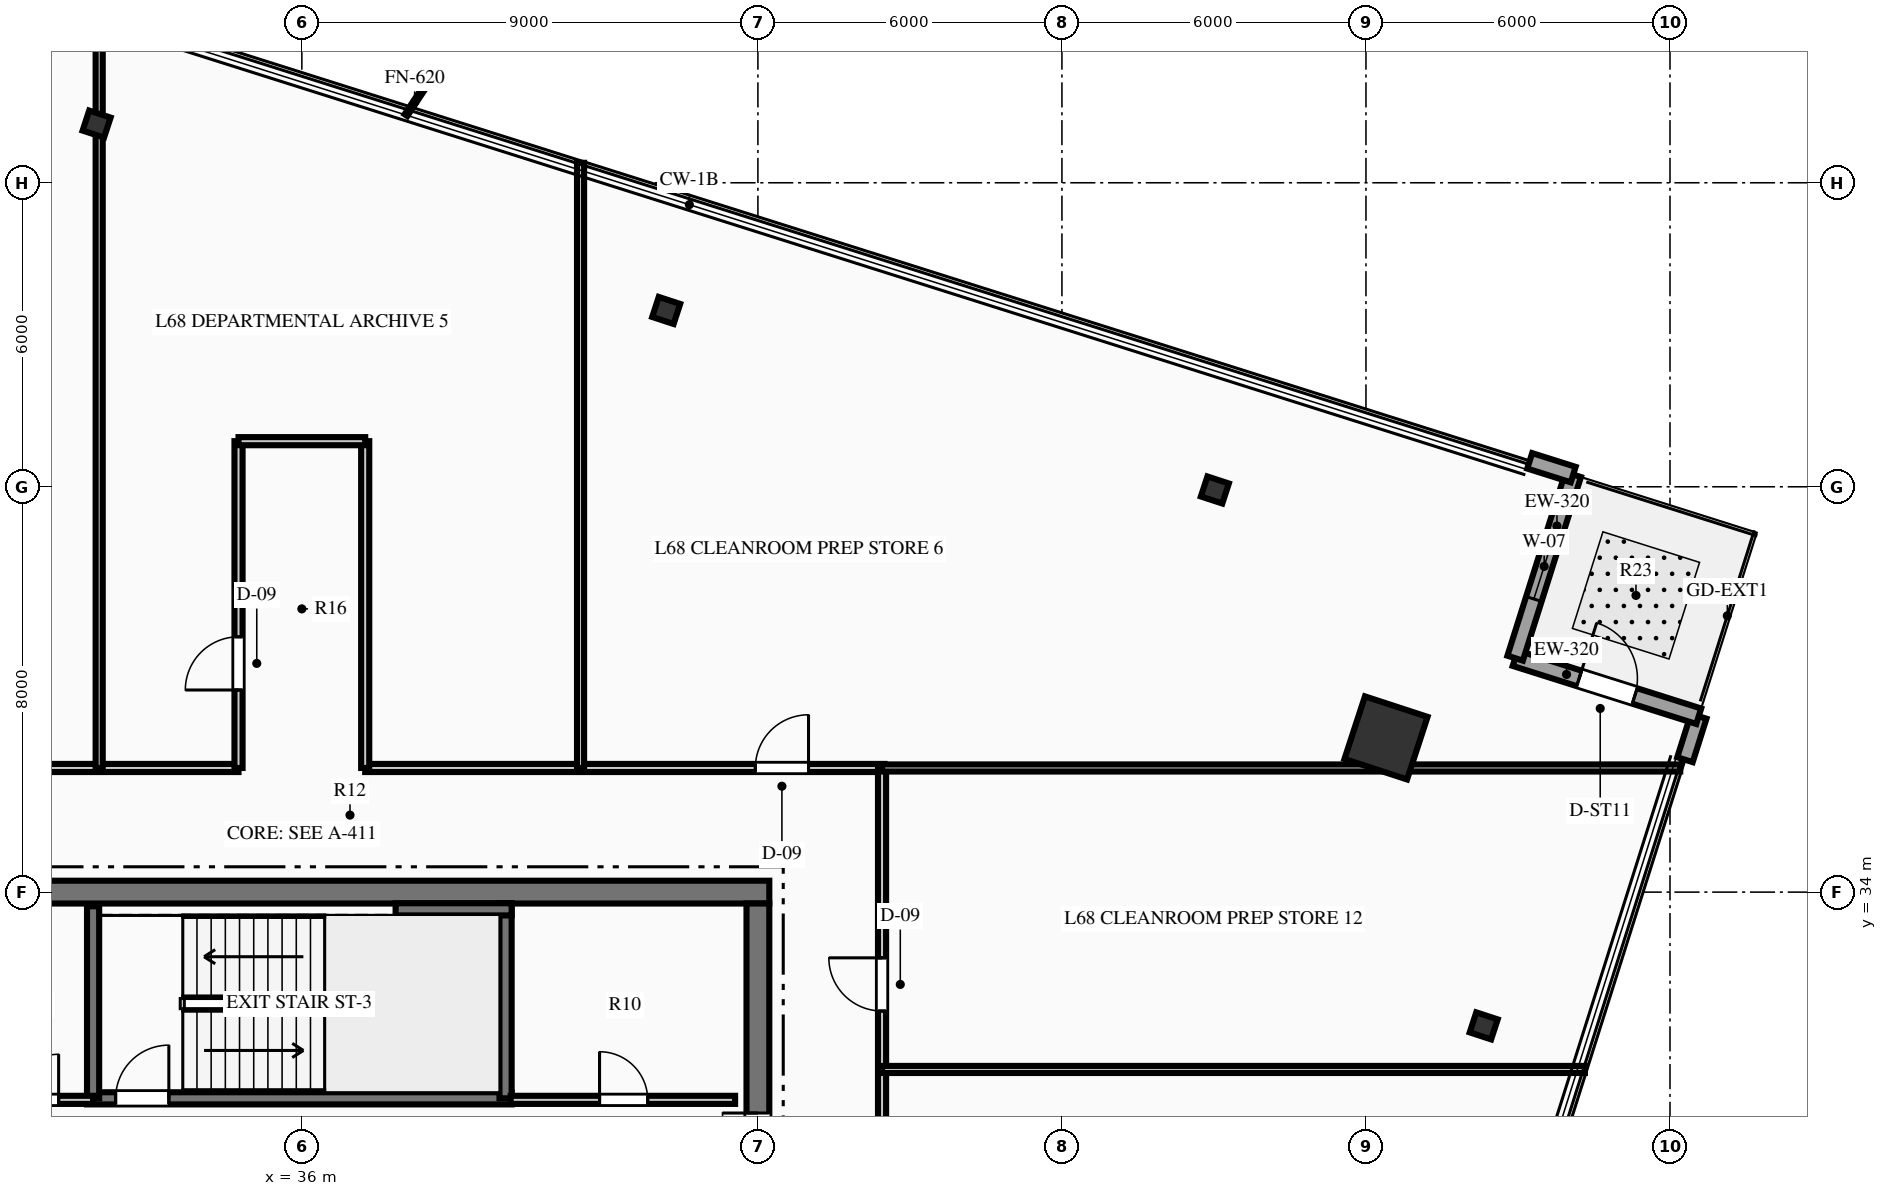
"""IFC4 building model, lengths in metres.
Left out: names, types, materials, properties, quantities, classifications, styles, units other than length and angle.
Written with IfcOpenShell. Run it as: python <this file> out.ifc"""

import sys

from ifc_helpers import new_model, si_unit, direction, frame, frame_2d, origin, origin_2d, place, context, subcontext, project, spatial, rectangle, hollow_rectangle, i_section, extrude, element, fill, save


model = new_model("IFC4")
c1 = context("Model", 3, precision=1e-05, world=origin(), true_north=direction((0.0, 1.0)))
c2 = subcontext(c1, "Body", "Model", "MODEL_VIEW")
j1 = project(units=[si_unit("LENGTHUNIT", "METRE"), si_unit("PLANEANGLEUNIT", "RADIAN")], contexts=[c1])
p1 = place(None, origin())
s1 = spatial("IfcSite", under=j1, at=p1, CompositionType="ELEMENT")
p2 = place(p1, origin())
s2 = spatial("IfcBuilding", under=s1, at=p2, CompositionType="ELEMENT")
p3 = place(p2, frame((0.0, 0.0, 271.2)))
s3 = spatial("IfcBuildingStorey", under=s2, at=p3, CompositionType="ELEMENT", Elevation=271.2)
p4 = place(p3, frame((26.775, 34.0, 0.0), z_axis=(0.0, 0.0, 1.0), x_axis=(1.0, 0.0, 0.0)))
e1 = element("IfcWall", 1, at=p4, inside=s3, PredefinedType="SHEAR", context=c2, shape_type="SweptSolid", body=[
    extrude(rectangle(XDim=18.45, YDim=0.45, at=frame_2d((9.225, 0.0))), origin(), (0.0, 0.0, 1.0), 3.75),
])
p5 = place(p3, frame((45.0, 18.225, 0.0), z_axis=(0.0, 0.0, 1.0), x_axis=(0.0, 1.0, 0.0)))
e2 = element("IfcWall", 2, at=p5, inside=s3, PredefinedType="SHEAR", context=c2, shape_type="SweptSolid", body=[
    extrude(rectangle(XDim=15.55, YDim=0.45, at=frame_2d((7.775, 0.0))), origin(), (0.0, 0.0, 1.0), 3.75),
])
p6 = place(p5, frame((10.015, 0.0, 0.0)))
e3 = element("IfcOpeningElement", 3, at=p6, cuts=e2, PredefinedType="OPENING", context=c2, shape_type="SweptSolid", body=[
    extrude(rectangle(XDim=1.4, YDim=2.2, at=frame_2d((0.7, 1.1))), frame((0.0, 0.235, 0.0), z_axis=(0.0, -1.0, 0.0), x_axis=(1.0, 0.0, 0.0)), (0.0, 0.0, 1.0), 0.47),
])
p7 = place(p3, frame((31.76, 29.93, 0.0), z_axis=(0.0, 0.0, 1.0), x_axis=(1.0, 0.0, 0.0)))
e4 = element("IfcWall", 4, at=p7, inside=s3, PredefinedType="SHEAR", context=c2, shape_type="SweptSolid", body=[
    extrude(rectangle(XDim=8.38, YDim=0.24, at=frame_2d((4.19, 0.0))), origin(), (0.0, 0.0, 1.0), 3.75),
])
p8 = place(p7, frame((0.565, 0.0, 0.0)))
e5 = element("IfcOpeningElement", 5, at=p8, cuts=e4, PredefinedType="OPENING", context=c2, shape_type="SweptSolid", body=[
    extrude(rectangle(XDim=1.05, YDim=2.15, at=frame_2d((0.525, 1.075))), frame((0.0, 0.13, 0.0), z_axis=(0.0, -1.0, 0.0), x_axis=(1.0, 0.0, 0.0)), (0.0, 0.0, 1.0), 0.26),
])
p9 = place(p3, frame((31.88, 29.93, 0.0), z_axis=(0.0, 0.0, 1.0), x_axis=(0.0, 1.0, 0.0)))
e6 = element("IfcWall", 6, at=p9, inside=s3, PredefinedType="SHEAR", context=c2, shape_type="SweptSolid", body=[
    extrude(rectangle(XDim=3.79, YDim=0.24, at=frame_2d((1.895, 0.0))), origin(), (0.0, 0.0, 1.0), 3.75),
])
p10 = place(p3, frame((40.02, 29.93, 0.0), z_axis=(0.0, 0.0, 1.0), x_axis=(0.0, 1.0, 0.0)))
e7 = element("IfcWall", 7, at=p10, inside=s3, PredefinedType="SHEAR", context=c2, shape_type="SweptSolid", body=[
    extrude(rectangle(XDim=3.85, YDim=0.24, at=frame_2d((1.925, 0.0))), origin(), (0.0, 0.0, 1.0), 3.75),
])
p11 = place(p3, frame((37.85, 33.66, 0.0), z_axis=(0.0, 0.0, 1.0), x_axis=(1.0, 0.0, 0.0)))
e8 = element("IfcWall", 8, at=p11, inside=s3, PredefinedType="SHEAR", context=c2, shape_type="SweptSolid", body=[
    extrude(rectangle(XDim=2.29, YDim=0.24, at=frame_2d((1.145, 0.0))), origin(), (0.0, 0.0, 1.0), 3.75),
])
p12 = place(p3, frame((57.396, 37.043, 0.0), z_axis=(0.0, 0.0, 1.0), x_axis=(0.311008203279, 0.950407227189, 0.0)))
e9 = element("IfcColumn", 9, at=p12, inside=s3, PredefinedType="COLUMN", context=c2, shape_type="SweptSolid", body=[
    extrude(hollow_rectangle(XDim=1.3, YDim=1.3, WallThickness=0.06, at=origin_2d()), origin(), (0.0, 0.0, 1.0), 3.75),
])
for number, where, z_axis, x_axis in (
    (10, (59.324, 31.36, 0.0), (0.0, 0.0, 1.0), (0.311, 0.95, 0.0)),
    (11, (54.018, 41.937, 0.0), (0.0, 0.0, 1.0), (0.311, 0.95, 0.0)),
    (12, (43.19, 45.48, 0.0), (0.0, 0.0, 1.0), (0.311, 0.95, 0.0)),
    (13, (31.949, 49.158, 0.0), (0.0, 0.0, 1.0), (0.311, 0.95, 0.0)),
):
    element("IfcColumn", number, at=place(p3, frame(where, z_axis=z_axis, x_axis=x_axis)), inside=s3, PredefinedType="COLUMN", context=c2, shape_type="SweptSolid", body=[
        extrude(i_section(OverallWidth=0.416, OverallDepth=0.445, WebThickness=0.039, FlangeThickness=0.063, at=origin_2d()), origin(), (0.0, 0.0, 1.0), 3.75),
    ])
p13 = place(p3, frame((63.567, 37.471, 0.0), z_axis=(0.0, 0.0, 1.0), x_axis=(-0.301378026662, -0.95350473782, 0.0)))
e14 = element("IfcWall", 14, at=p13, inside=s3, PredefinedType="STANDARD", context=c2, shape_type="SweptSolid", body=[
    extrude(rectangle(XDim=0.9, YDim=0.32, at=frame_2d((0.45, 0.0))), origin(), (0.0, 0.0, 1.0), 3.48),
])
p14 = place(p3, frame((59.944, 38.617, 0.0), z_axis=(0.0, 0.0, 1.0), x_axis=(0.953459265402, -0.301521855292, 0.0)))
e15 = element("IfcWall", 15, at=p14, inside=s3, PredefinedType="STANDARD", context=c2, shape_type="SweptSolid", body=[
    extrude(rectangle(XDim=3.8, YDim=0.32, at=frame_2d((1.9, 0.0))), origin(), (0.0, 0.0, 1.0), 3.48),
])
p15 = place(p14, frame((1.325, 0.0, 0.0)))
e16 = element("IfcOpeningElement", 16, at=p15, cuts=e15, PredefinedType="OPENING", context=c2, shape_type="SweptSolid", body=[
    extrude(rectangle(XDim=1.15, YDim=2.2, at=frame_2d((0.575, 1.1))), frame((0.0, 0.17, 0.0), z_axis=(0.0, -1.0, 0.0), x_axis=(1.0, 0.0, 0.0)), (0.0, 0.0, 1.0), 0.34),
])
p16 = place(p3, frame((61.09, 42.24, 0.0), z_axis=(0.0, 0.0, 1.0), x_axis=(-0.301503385419, -0.953465106116, 0.0)))
e17 = element("IfcWall", 17, at=p16, inside=s3, PredefinedType="STANDARD", context=c2, shape_type="SweptSolid", body=[
    extrude(rectangle(XDim=3.8, YDim=0.32, at=frame_2d((1.9, 0.0))), origin(), (0.0, 0.0, 1.0), 3.48),
])
p17 = place(p16, frame((1.225, 0.0, 0.85)))
e18 = element("IfcOpeningElement", 18, at=p17, cuts=e17, PredefinedType="OPENING", context=c2, shape_type="SweptSolid", body=[
    extrude(rectangle(XDim=1.35, YDim=1.95, at=frame_2d((0.675, 0.975))), frame((0.0, 0.17, 0.0), z_axis=(0.0, -1.0, 0.0), x_axis=(1.0, 0.0, 0.0)), (0.0, 0.0, 1.0), 0.34),
])
p18 = place(p3, frame((60.232, 42.512, 0.0), z_axis=(0.0, 0.0, 1.0), x_axis=(0.95350473782, -0.301378026662, 0.0)))
e19 = element("IfcWall", 19, at=p18, inside=s3, PredefinedType="STANDARD", context=c2, shape_type="SweptSolid", body=[
    extrude(rectangle(XDim=0.9, YDim=0.32, at=frame_2d((0.45, 0.0))), origin(), (0.0, 0.0, 1.0), 3.48),
])
p19 = place(p3, frame((27.45, 29.9, 0.0), z_axis=(0.0, 0.0, 1.0), x_axis=(1.0, 0.0, 0.0)))
e20 = element("IfcWall", 20, at=p19, inside=s3, PredefinedType="PARTITIONING", context=c2, shape_type="SweptSolid", body=[
    extrude(rectangle(XDim=4.43, YDim=0.16, at=frame_2d((2.215, 0.0))), origin(), (0.0, 0.0, 1.0), 3.48),
])
p20 = place(p19, frame((0.6, 0.0, 0.0)))
e21 = element("IfcOpeningElement", 21, at=p20, cuts=e20, PredefinedType="OPENING", context=c2, shape_type="SweptSolid", body=[
    extrude(rectangle(XDim=0.9, YDim=2.15, at=frame_2d((0.45, 1.075))), frame((0.0, 0.09, 0.0), z_axis=(0.0, -1.0, 0.0), x_axis=(1.0, 0.0, 0.0)), (0.0, 0.0, 1.0), 0.18),
])
p21 = place(p19, frame((2.85, 0.0, 0.0)))
e22 = element("IfcOpeningElement", 22, at=p21, cuts=e20, PredefinedType="OPENING", context=c2, shape_type="SweptSolid", body=[
    extrude(rectangle(XDim=0.9, YDim=2.15, at=frame_2d((0.45, 1.075))), frame((0.0, 0.09, 0.0), z_axis=(0.0, -1.0, 0.0), x_axis=(1.0, 0.0, 0.0)), (0.0, 0.0, 1.0), 0.18),
])
p22 = place(p3, frame((40.12, 29.9, 0.0), z_axis=(0.0, 0.0, 1.0), x_axis=(1.0, 0.0, 0.0)))
e23 = element("IfcWall", 23, at=p22, inside=s3, PredefinedType="PARTITIONING", context=c2, shape_type="SweptSolid", body=[
    extrude(rectangle(XDim=4.43, YDim=0.16, at=frame_2d((2.215, 0.0))), origin(), (0.0, 0.0, 1.0), 3.48),
])
p23 = place(p22, frame((1.755, 0.0, 0.0)))
e24 = element("IfcOpeningElement", 24, at=p23, cuts=e23, PredefinedType="OPENING", context=c2, shape_type="SweptSolid", body=[
    extrude(rectangle(XDim=0.95, YDim=2.15, at=frame_2d((0.475, 1.075))), frame((0.0, 0.09, 0.0), z_axis=(0.0, -1.0, 0.0), x_axis=(1.0, 0.0, 0.0)), (0.0, 0.0, 1.0), 0.18),
])
p24 = place(p3, frame((24.5, 36.45, 0.0), z_axis=(0.0, 0.0, 1.0), x_axis=(1.0, 0.0, 0.0)))
e25 = element("IfcWall", 25, at=p24, inside=s3, PredefinedType="PARTITIONING", context=c2, shape_type="SweptSolid", body=[
    extrude(rectangle(XDim=10.25, YDim=0.16, at=frame_2d((5.125, 0.0))), origin(), (0.0, 0.0, 1.0), 3.48),
])
p25 = place(p24, frame((0.67, 0.0, 0.0)))
e26 = element("IfcOpeningElement", 26, at=p25, cuts=e25, PredefinedType="OPENING", context=c2, shape_type="SweptSolid", body=[
    extrude(rectangle(XDim=1.05, YDim=2.15, at=frame_2d((0.525, 1.075))), frame((0.0, 0.09, 0.0), z_axis=(0.0, -1.0, 0.0), x_axis=(1.0, 0.0, 0.0)), (0.0, 0.0, 1.0), 0.18),
])
p26 = place(p24, frame((5.335, 0.0, 0.0)))
e27 = element("IfcOpeningElement", 27, at=p26, cuts=e25, PredefinedType="OPENING", context=c2, shape_type="SweptSolid", body=[
    extrude(rectangle(XDim=1.05, YDim=2.15, at=frame_2d((0.525, 1.075))), frame((0.0, 0.09, 0.0), z_axis=(0.0, -1.0, 0.0), x_axis=(1.0, 0.0, 0.0)), (0.0, 0.0, 1.0), 0.18),
])
p27 = place(p3, frame((37.25, 36.45, 0.0), z_axis=(0.0, 0.0, 1.0), x_axis=(1.0, 0.0, 0.0)))
e28 = element("IfcWall", 28, at=p27, inside=s3, PredefinedType="PARTITIONING", context=c2, shape_type="SweptSolid", body=[
    extrude(rectangle(XDim=10.25, YDim=0.16, at=frame_2d((5.125, 0.0))), origin(), (0.0, 0.0, 1.0), 3.48),
])
p28 = place(p27, frame((7.699, 0.0, 0.0)))
e29 = element("IfcOpeningElement", 29, at=p28, cuts=e28, PredefinedType="OPENING", context=c2, shape_type="SweptSolid", body=[
    extrude(rectangle(XDim=1.05, YDim=2.15, at=frame_2d((0.525, 1.075))), frame((0.0, 0.09, 0.0), z_axis=(0.0, -1.0, 0.0), x_axis=(1.0, 0.0, 0.0)), (0.0, 0.0, 1.0), 0.18),
])
p29 = place(p3, frame((47.45, 27.25, 0.0), z_axis=(0.0, 0.0, 1.0), x_axis=(0.0, 1.0, 0.0)))
e30 = element("IfcWall", 30, at=p29, inside=s3, PredefinedType="PARTITIONING", context=c2, shape_type="SweptSolid", body=[
    extrude(rectangle(XDim=9.2, YDim=0.16, at=frame_2d((4.6, 0.0))), origin(), (0.0, 0.0, 1.0), 3.48),
])
p30 = place(p29, frame((4.403, 0.0, 0.0)))
e31 = element("IfcOpeningElement", 31, at=p30, cuts=e30, PredefinedType="OPENING", context=c2, shape_type="SweptSolid", body=[
    extrude(rectangle(XDim=1.05, YDim=2.15, at=frame_2d((0.525, 1.075))), frame((0.0, 0.09, 0.0), z_axis=(0.0, -1.0, 0.0), x_axis=(1.0, 0.0, 0.0)), (0.0, 0.0, 1.0), 0.18),
])
p31 = place(p3, frame((34.75, 36.45, 0.0), z_axis=(0.0, 0.0, 1.0), x_axis=(0.0, 1.0, 0.0)))
e32 = element("IfcWall", 32, at=p31, inside=s3, PredefinedType="PARTITIONING", context=c2, shape_type="SweptSolid", body=[
    extrude(rectangle(XDim=6.45, YDim=0.16, at=frame_2d((3.225, 0.0))), origin(), (0.0, 0.0, 1.0), 3.48),
])
p32 = place(p31, frame((1.539, 0.0, 0.0)))
e33 = element("IfcOpeningElement", 33, at=p32, cuts=e32, PredefinedType="OPENING", context=c2, shape_type="SweptSolid", body=[
    extrude(rectangle(XDim=1.05, YDim=2.15, at=frame_2d((0.525, 1.075))), frame((0.0, 0.09, 0.0), z_axis=(0.0, -1.0, 0.0), x_axis=(1.0, 0.0, 0.0)), (0.0, 0.0, 1.0), 0.18),
])
p33 = place(p3, frame((37.25, 36.45, 0.0), z_axis=(0.0, 0.0, 1.0), x_axis=(0.0, 1.0, 0.0)))
e34 = element("IfcWall", 34, at=p33, inside=s3, PredefinedType="PARTITIONING", context=c2, shape_type="SweptSolid", body=[
    extrude(rectangle(XDim=6.45, YDim=0.16, at=frame_2d((3.225, 0.0))), origin(), (0.0, 0.0, 1.0), 3.48),
])
p34 = place(p3, frame((34.75, 42.9, 0.0), z_axis=(0.0, 0.0, 1.0), x_axis=(1.0, 0.0, 0.0)))
e35 = element("IfcWall", 35, at=p34, inside=s3, PredefinedType="PARTITIONING", context=c2, shape_type="SweptSolid", body=[
    extrude(rectangle(XDim=2.5, YDim=0.16, at=frame_2d((1.25, 0.0))), origin(), (0.0, 0.0, 1.0), 3.48),
])
p35 = place(p3, frame((47.45, 36.45, 0.0), z_axis=(0.0, 0.0, 1.0), x_axis=(1.0, 0.0, 0.0)))
e36 = element("IfcWall", 36, at=p35, inside=s3, PredefinedType="PARTITIONING", context=c2, shape_type="SweptSolid", body=[
    extrude(rectangle(XDim=15.752, YDim=0.14, at=frame_2d((7.876, 0.0))), origin(), (0.0, 0.0, 1.0), 2.858),
])
p36 = place(p3, frame((32.0, 36.45, 0.0), z_axis=(0.0, 0.0, 1.0), x_axis=(0.0, 1.0, 0.0)))
e37 = element("IfcWall", 37, at=p36, inside=s3, PredefinedType="PARTITIONING", context=c2, shape_type="SweptSolid", body=[
    extrude(rectangle(XDim=14.948, YDim=0.14, at=frame_2d((7.474, 0.0))), origin(), (0.0, 0.0, 1.0), 2.858),
])
p37 = place(p3, frame((41.5, 36.45, 0.0), z_axis=(0.0, 0.0, 1.0), x_axis=(0.0, 1.0, 0.0)))
e38 = element("IfcWall", 38, at=p37, inside=s3, PredefinedType="PARTITIONING", context=c2, shape_type="SweptSolid", body=[
    extrude(rectangle(XDim=11.944, YDim=0.14, at=frame_2d((5.972, 0.0))), origin(), (0.0, 0.0, 1.0), 3.48),
])
p38 = place(p3, frame((47.45, 30.5, 0.0), z_axis=(0.0, 0.0, 1.0), x_axis=(1.0, 0.0, 0.0)))
e39 = element("IfcWall", 39, at=p38, inside=s3, PredefinedType="PARTITIONING", context=c2, shape_type="SweptSolid", body=[
    extrude(rectangle(XDim=13.871, YDim=0.14, at=frame_2d((6.935, 0.0))), origin(), (0.0, 0.0, 1.0), 3.48),
])
p39 = place(p15, origin())
e40 = element("IfcDoor", 40, at=p39, inside=s3, OperationType="SINGLE_SWING_LEFT", PredefinedType="DOOR", context=c2, shape_type="SweptSolid", body=[
    extrude(rectangle(XDim=1.15, YDim=2.2, at=frame_2d((0.575, 1.1))), frame((0.0, 0.025, 0.0), z_axis=(0.0, -1.0, 0.0), x_axis=(1.0, 0.0, 0.0)), (0.0, 0.0, 1.0), 0.05),
])
fill(e16, e40)
p40 = place(p17, origin())
e41 = element("IfcWindow", 41, at=p40, inside=s3, PartitioningType="SINGLE_PANEL", PredefinedType="WINDOW", context=c2, shape_type="SweptSolid", body=[
    extrude(rectangle(XDim=1.35, YDim=1.95, at=frame_2d((0.675, 0.975))), frame((0.0, 0.03, 0.0), z_axis=(0.0, -1.0, 0.0), x_axis=(1.0, 0.0, 0.0)), (0.0, 0.0, 1.0), 0.06),
])
fill(e18, e41)
p41 = place(p21, origin())
e42 = element("IfcDoor", 42, at=p41, inside=s3, OperationType="SINGLE_SWING_RIGHT", PredefinedType="DOOR", context=c2, shape_type="SweptSolid", body=[
    extrude(rectangle(XDim=0.9, YDim=2.15, at=frame_2d((0.45, 1.075))), frame((0.0, 0.025, 0.0), z_axis=(0.0, -1.0, 0.0), x_axis=(1.0, 0.0, 0.0)), (0.0, 0.0, 1.0), 0.05),
])
fill(e22, e42)
p42 = place(p23, origin())
e43 = element("IfcDoor", 43, at=p42, inside=s3, OperationType="SINGLE_SWING_LEFT", PredefinedType="DOOR", context=c2, shape_type="SweptSolid", body=[
    extrude(rectangle(XDim=0.95, YDim=2.15, at=frame_2d((0.475, 1.075))), frame((0.0, 0.025, 0.0), z_axis=(0.0, -1.0, 0.0), x_axis=(1.0, 0.0, 0.0)), (0.0, 0.0, 1.0), 0.05),
])
fill(e24, e43)
p43 = place(p8, origin())
e44 = element("IfcDoor", 44, at=p43, inside=s3, OperationType="SINGLE_SWING_RIGHT", PredefinedType="DOOR", context=c2, shape_type="SweptSolid", body=[
    extrude(rectangle(XDim=1.05, YDim=2.15, at=frame_2d((0.525, 1.075))), frame((0.0, 0.025, 0.0), z_axis=(0.0, -1.0, 0.0), x_axis=(1.0, 0.0, 0.0)), (0.0, 0.0, 1.0), 0.05),
])
fill(e5, e44)
p44 = place(p6, origin())
e45 = element("IfcDoor", 45, at=p44, inside=s3, OperationType="DOUBLE_DOOR_SINGLE_SWING", PredefinedType="DOOR", context=c2, shape_type="SweptSolid", body=[
    extrude(rectangle(XDim=1.4, YDim=2.2, at=frame_2d((0.7, 1.1))), frame((0.0, 0.025, 0.0), z_axis=(0.0, -1.0, 0.0), x_axis=(1.0, 0.0, 0.0)), (0.0, 0.0, 1.0), 0.05),
])
fill(e3, e45)
p45 = place(p32, origin())
e46 = element("IfcDoor", 46, at=p45, inside=s3, OperationType="SINGLE_SWING_LEFT", PredefinedType="DOOR", context=c2, shape_type="SweptSolid", body=[
    extrude(rectangle(XDim=1.05, YDim=2.15, at=frame_2d((0.525, 1.075))), frame((0.0, 0.025, 0.0), z_axis=(0.0, -1.0, 0.0), x_axis=(1.0, 0.0, 0.0)), (0.0, 0.0, 1.0), 0.05),
])
fill(e33, e46)
p46 = place(p28, origin())
e47 = element("IfcDoor", 47, at=p46, inside=s3, OperationType="SINGLE_SWING_RIGHT", PredefinedType="DOOR", context=c2, shape_type="SweptSolid", body=[
    extrude(rectangle(XDim=1.05, YDim=2.15, at=frame_2d((0.525, 1.075))), frame((0.0, 0.025, 0.0), z_axis=(0.0, -1.0, 0.0), x_axis=(1.0, 0.0, 0.0)), (0.0, 0.0, 1.0), 0.05),
])
fill(e29, e47)
p47 = place(p30, origin())
e48 = element("IfcDoor", 48, at=p47, inside=s3, OperationType="SINGLE_SWING_RIGHT", PredefinedType="DOOR", context=c2, shape_type="SweptSolid", body=[
    extrude(rectangle(XDim=1.05, YDim=2.15, at=frame_2d((0.525, 1.075))), frame((0.0, 0.025, 0.0), z_axis=(0.0, -1.0, 0.0), x_axis=(1.0, 0.0, 0.0)), (0.0, 0.0, 1.0), 0.05),
])
fill(e31, e48)
save(model, sys.argv[1])
